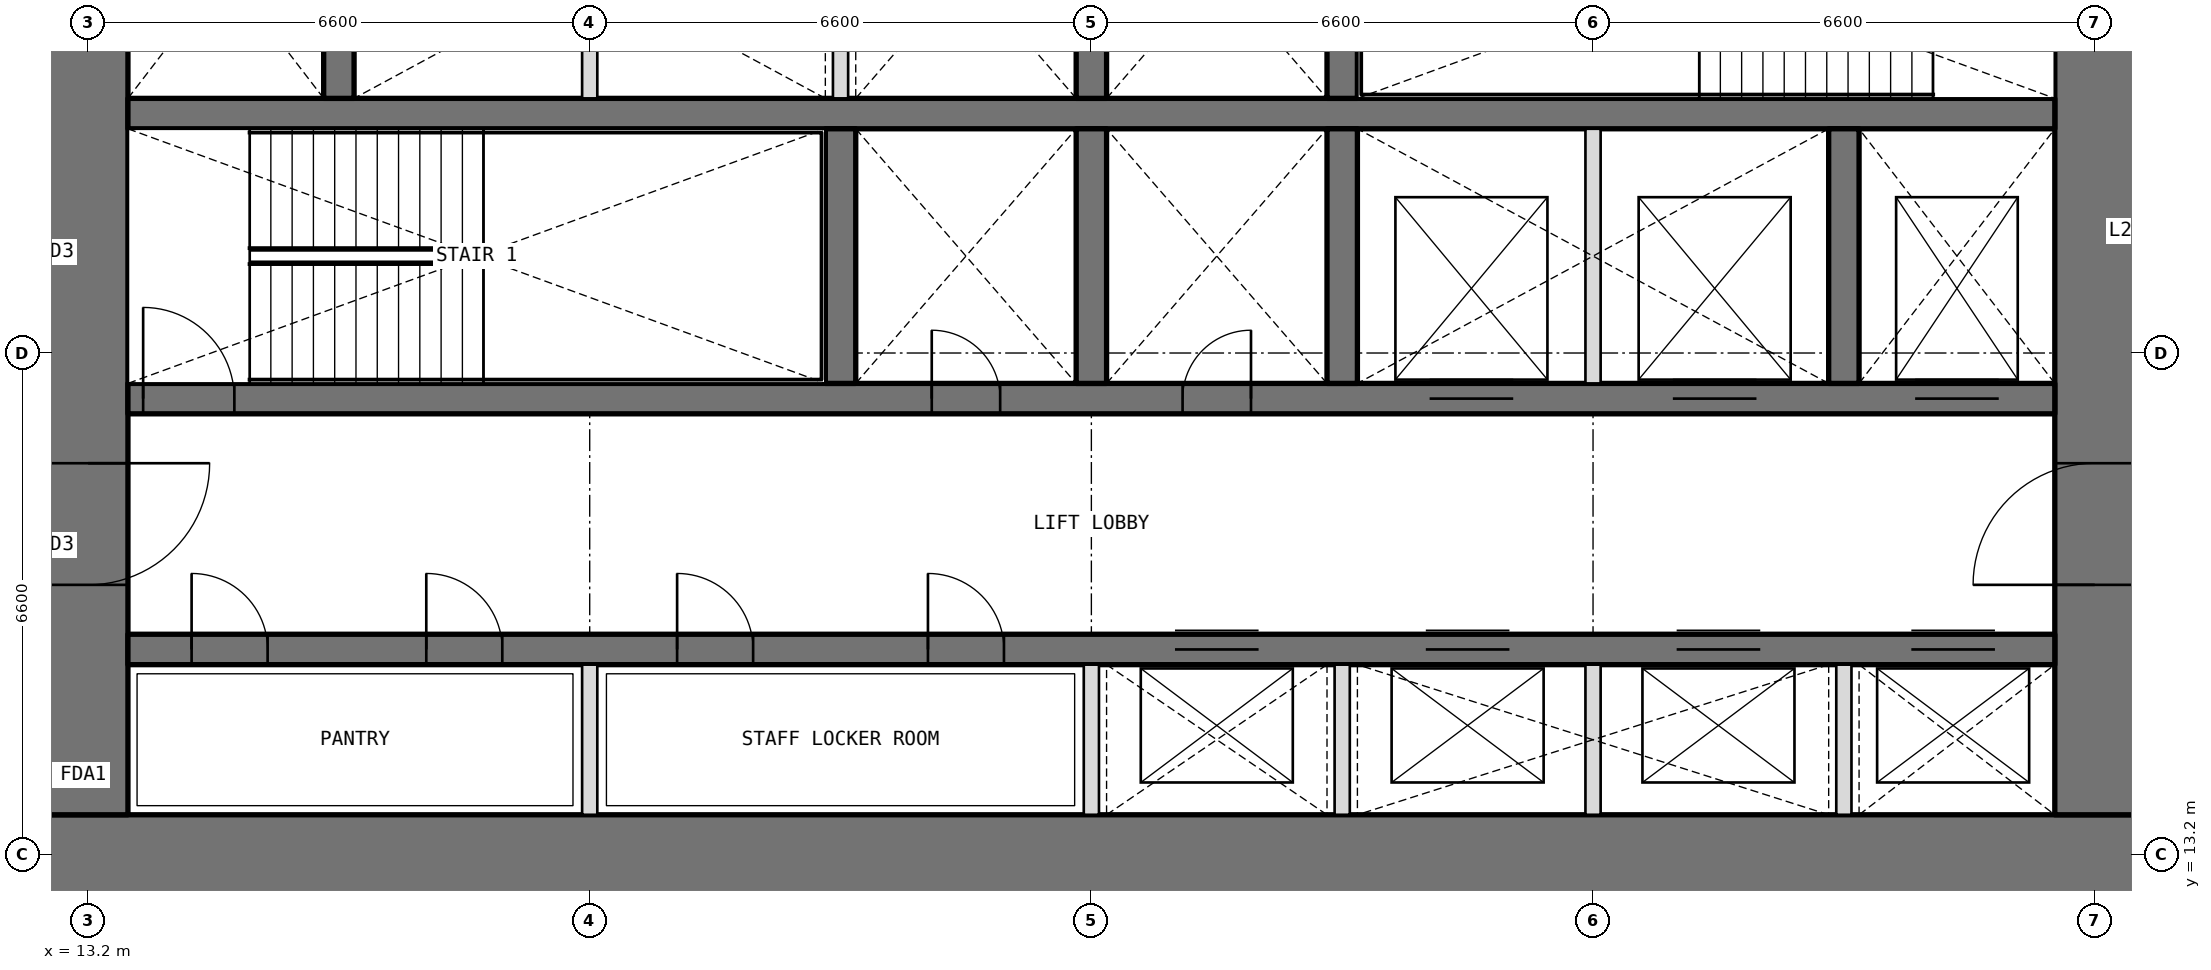
"""IFC4 building model, lengths in metres.
Left out: names, types, materials, properties, quantities, classifications, styles, units other than length and angle.
Written with IfcOpenShell. Run it as: python <this file> out.ifc"""

import sys

from ifc_helpers import new_model, si_unit, direction, frame, frame_2d, origin, place, context, subcontext, project, spatial, rectangle, extrude, element, fill, save


model = new_model("IFC4")
c1 = context("Model", 3, precision=1e-05, world=origin(), true_north=direction((0.0, 1.0)))
c2 = subcontext(c1, "Body", "Model", "MODEL_VIEW")
j1 = project(units=[si_unit("LENGTHUNIT", "METRE"), si_unit("PLANEANGLEUNIT", "RADIAN")], contexts=[c1])
p1 = place(None, origin())
s1 = spatial("IfcSite", under=j1, at=p1, CompositionType="ELEMENT")
p2 = place(p1, origin())
s2 = spatial("IfcBuilding", under=s1, at=p2, CompositionType="ELEMENT")
p3 = place(p2, frame((0.0, 0.0, 128.4)))
s3 = spatial("IfcBuildingStorey", under=s2, at=p3, CompositionType="ELEMENT", Elevation=128.4)
p4 = place(p3, frame((12.675, 13.2, 0.0), z_axis=(0.0, 0.0, 1.0), x_axis=(1.0, 0.0, 0.0)))
e1 = element("IfcWall", 1, at=p4, inside=s3, PredefinedType="SHEAR", context=c2, shape_type="SweptSolid", body=[
    extrude(rectangle(XDim=27.45, YDim=1.05, at=frame_2d((13.725, 0.0))), origin(), (0.0, 0.0, 1.0), 4.2),
])
p5 = place(p3, frame((39.6, 13.725, 0.0), z_axis=(0.0, 0.0, 1.0), x_axis=(0.0, 1.0, 0.0)))
e2 = element("IfcWall", 2, at=p5, inside=s3, PredefinedType="SHEAR", context=c2, shape_type="SweptSolid", body=[
    extrude(rectangle(XDim=18.75, YDim=1.05, at=frame_2d((9.375, 0.0))), origin(), (0.0, 0.0, 1.0), 4.2),
])
p6 = place(p5, frame((3.025, 0.0, 0.0)))
e3 = element("IfcOpeningElement", 3, at=p6, cuts=e2, PredefinedType="OPENING", context=c2, shape_type="SweptSolid", body=[
    extrude(rectangle(XDim=1.6, YDim=2.1, at=frame_2d((0.8, 1.05))), frame((0.0, 0.535, 0.0), z_axis=(0.0, -1.0, 0.0), x_axis=(1.0, 0.0, 0.0)), (0.0, 0.0, 1.0), 1.07),
])
p7 = place(p5, frame((13.825, 0.0, 0.0)))
e4 = element("IfcOpeningElement", 4, at=p7, cuts=e2, PredefinedType="OPENING", context=c2, shape_type="SweptSolid", body=[
    extrude(rectangle(XDim=1.6, YDim=2.1, at=frame_2d((0.8, 1.05))), frame((0.0, 0.535, 0.0), z_axis=(0.0, -1.0, 0.0), x_axis=(1.0, 0.0, 0.0)), (0.0, 0.0, 1.0), 1.07),
])
p8 = place(p3, frame((13.2, 32.475, 0.0), z_axis=(0.0, 0.0, 1.0), x_axis=(0.0, -1.0, 0.0)))
e5 = element("IfcWall", 5, at=p8, inside=s3, PredefinedType="SHEAR", context=c2, shape_type="SweptSolid", body=[
    extrude(rectangle(XDim=18.75, YDim=1.05, at=frame_2d((9.375, 0.0))), origin(), (0.0, 0.0, 1.0), 4.2),
])
p9 = place(p8, frame((14.125, 0.0, 0.0)))
e6 = element("IfcOpeningElement", 6, at=p9, cuts=e5, PredefinedType="OPENING", context=c2, shape_type="SweptSolid", body=[
    extrude(rectangle(XDim=1.6, YDim=2.1, at=frame_2d((0.8, 1.05))), frame((0.0, 0.535, 0.0), z_axis=(0.0, -1.0, 0.0), x_axis=(1.0, 0.0, 0.0)), (0.0, 0.0, 1.0), 1.07),
])
p10 = place(p8, frame((3.325, 0.0, 0.0)))
e7 = element("IfcOpeningElement", 7, at=p10, cuts=e5, PredefinedType="OPENING", context=c2, shape_type="SweptSolid", body=[
    extrude(rectangle(XDim=1.6, YDim=2.1, at=frame_2d((0.8, 1.05))), frame((0.0, 0.535, 0.0), z_axis=(0.0, -1.0, 0.0), x_axis=(1.0, 0.0, 0.0)), (0.0, 0.0, 1.0), 1.07),
])
p11 = place(p3, frame((13.725, 15.9, 0.0), z_axis=(0.0, 0.0, 1.0), x_axis=(1.0, 0.0, 0.0)))
e8 = element("IfcWall", 8, at=p11, inside=s3, PredefinedType="SHEAR", context=c2, shape_type="SweptSolid", body=[
    extrude(rectangle(XDim=25.35, YDim=0.4, at=frame_2d((12.675, 0.0))), origin(), (0.0, 0.0, 1.0), 4.2),
])
p12 = place(p11, frame((0.837, 0.0, 0.0)))
e9 = element("IfcOpeningElement", 9, at=p12, cuts=e8, PredefinedType="OPENING", context=c2, shape_type="SweptSolid", body=[
    extrude(rectangle(XDim=1.0, YDim=2.1, at=frame_2d((0.5, 1.05))), frame((0.0, 0.21, 0.0), z_axis=(0.0, -1.0, 0.0), x_axis=(1.0, 0.0, 0.0)), (0.0, 0.0, 1.0), 0.42),
])
p13 = place(p11, frame((3.925, 0.0, 0.0)))
e10 = element("IfcOpeningElement", 10, at=p13, cuts=e8, PredefinedType="OPENING", context=c2, shape_type="SweptSolid", body=[
    extrude(rectangle(XDim=1.0, YDim=2.1, at=frame_2d((0.5, 1.05))), frame((0.0, 0.21, 0.0), z_axis=(0.0, -1.0, 0.0), x_axis=(1.0, 0.0, 0.0)), (0.0, 0.0, 1.0), 0.42),
])
p14 = place(p11, frame((7.225, 0.0, 0.0)))
e11 = element("IfcOpeningElement", 11, at=p14, cuts=e8, PredefinedType="OPENING", context=c2, shape_type="SweptSolid", body=[
    extrude(rectangle(XDim=1.0, YDim=2.1, at=frame_2d((0.5, 1.05))), frame((0.0, 0.21, 0.0), z_axis=(0.0, -1.0, 0.0), x_axis=(1.0, 0.0, 0.0)), (0.0, 0.0, 1.0), 0.42),
])
p15 = place(p11, frame((10.525, 0.0, 0.0)))
e12 = element("IfcOpeningElement", 12, at=p15, cuts=e8, PredefinedType="OPENING", context=c2, shape_type="SweptSolid", body=[
    extrude(rectangle(XDim=1.0, YDim=2.1, at=frame_2d((0.5, 1.05))), frame((0.0, 0.21, 0.0), z_axis=(0.0, -1.0, 0.0), x_axis=(1.0, 0.0, 0.0)), (0.0, 0.0, 1.0), 0.42),
])
p16 = place(p11, frame((13.775, 0.0, 0.0)))
e13 = element("IfcOpeningElement", 13, at=p16, cuts=e8, PredefinedType="OPENING", context=c2, shape_type="SweptSolid", body=[
    extrude(rectangle(XDim=1.1, YDim=2.1, at=frame_2d((0.55, 1.05))), frame((0.0, 0.21, 0.0), z_axis=(0.0, -1.0, 0.0), x_axis=(1.0, 0.0, 0.0)), (0.0, 0.0, 1.0), 0.42),
])
p17 = place(p11, frame((17.075, 0.0, 0.0)))
e14 = element("IfcOpeningElement", 14, at=p17, cuts=e8, PredefinedType="OPENING", context=c2, shape_type="SweptSolid", body=[
    extrude(rectangle(XDim=1.1, YDim=2.1, at=frame_2d((0.55, 1.05))), frame((0.0, 0.21, 0.0), z_axis=(0.0, -1.0, 0.0), x_axis=(1.0, 0.0, 0.0)), (0.0, 0.0, 1.0), 0.42),
])
p18 = place(p11, frame((20.375, 0.0, 0.0)))
e15 = element("IfcOpeningElement", 15, at=p18, cuts=e8, PredefinedType="OPENING", context=c2, shape_type="SweptSolid", body=[
    extrude(rectangle(XDim=1.1, YDim=2.1, at=frame_2d((0.55, 1.05))), frame((0.0, 0.21, 0.0), z_axis=(0.0, -1.0, 0.0), x_axis=(1.0, 0.0, 0.0)), (0.0, 0.0, 1.0), 0.42),
])
p19 = place(p11, frame((23.462, 0.0, 0.0)))
e16 = element("IfcOpeningElement", 16, at=p19, cuts=e8, PredefinedType="OPENING", context=c2, shape_type="SweptSolid", body=[
    extrude(rectangle(XDim=1.1, YDim=2.1, at=frame_2d((0.55, 1.05))), frame((0.0, 0.21, 0.0), z_axis=(0.0, -1.0, 0.0), x_axis=(1.0, 0.0, 0.0)), (0.0, 0.0, 1.0), 0.42),
])
p20 = place(p3, frame((13.725, 19.2, 0.0), z_axis=(0.0, 0.0, 1.0), x_axis=(1.0, 0.0, 0.0)))
e17 = element("IfcWall", 17, at=p20, inside=s3, PredefinedType="SHEAR", context=c2, shape_type="SweptSolid", body=[
    extrude(rectangle(XDim=25.35, YDim=0.4, at=frame_2d((12.675, 0.0))), origin(), (0.0, 0.0, 1.0), 4.2),
])
p21 = place(p20, frame((10.575, 0.0, 0.0)))
e18 = element("IfcOpeningElement", 18, at=p21, cuts=e17, PredefinedType="OPENING", context=c2, shape_type="SweptSolid", body=[
    extrude(rectangle(XDim=0.9, YDim=2.1, at=frame_2d((0.45, 1.05))), frame((0.0, 0.21, 0.0), z_axis=(0.0, -1.0, 0.0), x_axis=(1.0, 0.0, 0.0)), (0.0, 0.0, 1.0), 0.42),
])
p22 = place(p20, frame((13.875, 0.0, 0.0)))
e19 = element("IfcOpeningElement", 19, at=p22, cuts=e17, PredefinedType="OPENING", context=c2, shape_type="SweptSolid", body=[
    extrude(rectangle(XDim=0.9, YDim=2.1, at=frame_2d((0.45, 1.05))), frame((0.0, 0.21, 0.0), z_axis=(0.0, -1.0, 0.0), x_axis=(1.0, 0.0, 0.0)), (0.0, 0.0, 1.0), 0.42),
])
p23 = place(p20, frame((0.2, 0.0, 0.0)))
e20 = element("IfcOpeningElement", 20, at=p23, cuts=e17, PredefinedType="OPENING", context=c2, shape_type="SweptSolid", body=[
    extrude(rectangle(XDim=1.2, YDim=2.1, at=frame_2d((0.6, 1.05))), frame((0.0, 0.21, 0.0), z_axis=(0.0, -1.0, 0.0), x_axis=(1.0, 0.0, 0.0)), (0.0, 0.0, 1.0), 0.42),
])
p24 = place(p20, frame((23.512, 0.0, 0.0)))
e21 = element("IfcOpeningElement", 21, at=p24, cuts=e17, PredefinedType="OPENING", context=c2, shape_type="SweptSolid", body=[
    extrude(rectangle(XDim=1.1, YDim=2.1, at=frame_2d((0.55, 1.05))), frame((0.0, 0.21, 0.0), z_axis=(0.0, -1.0, 0.0), x_axis=(1.0, 0.0, 0.0)), (0.0, 0.0, 1.0), 0.42),
])
p25 = place(p20, frame((17.125, 0.0, 0.0)))
e22 = element("IfcOpeningElement", 22, at=p25, cuts=e17, PredefinedType="OPENING", context=c2, shape_type="SweptSolid", body=[
    extrude(rectangle(XDim=1.1, YDim=2.1, at=frame_2d((0.55, 1.05))), frame((0.0, 0.21, 0.0), z_axis=(0.0, -1.0, 0.0), x_axis=(1.0, 0.0, 0.0)), (0.0, 0.0, 1.0), 0.42),
])
p26 = place(p20, frame((20.325, 0.0, 0.0)))
e23 = element("IfcOpeningElement", 23, at=p26, cuts=e17, PredefinedType="OPENING", context=c2, shape_type="SweptSolid", body=[
    extrude(rectangle(XDim=1.1, YDim=2.1, at=frame_2d((0.55, 1.05))), frame((0.0, 0.21, 0.0), z_axis=(0.0, -1.0, 0.0), x_axis=(1.0, 0.0, 0.0)), (0.0, 0.0, 1.0), 0.42),
])
p27 = place(p3, frame((13.725, 22.95, 0.0), z_axis=(0.0, 0.0, 1.0), x_axis=(1.0, 0.0, 0.0)))
e24 = element("IfcWall", 24, at=p27, inside=s3, PredefinedType="SHEAR", context=c2, shape_type="SweptSolid", body=[
    extrude(rectangle(XDim=25.35, YDim=0.4, at=frame_2d((12.675, 0.0))), origin(), (0.0, 0.0, 1.0), 4.2),
])
for number, where, z_axis, x_axis in (
    (25, (23.1, 19.4, 0.0), (0.0, 0.0, 1.0), (0.0, 1.0, 0.0)),
    (26, (26.4, 19.4, 0.0), (0.0, 0.0, 1.0), (0.0, 1.0, 0.0)),
    (27, (29.7, 19.4, 0.0), (0.0, 0.0, 1.0), (0.0, 1.0, 0.0)),
    (28, (36.3, 19.4, 0.0), (0.0, 0.0, 1.0), (0.0, 1.0, 0.0)),
    (29, (16.5, 23.15, 0.0), (0.0, 0.0, 1.0), (0.0, 1.0, 0.0)),
    (30, (26.4, 23.15, 0.0), (0.0, 0.0, 1.0), (0.0, 1.0, 0.0)),
    (31, (29.7, 23.15, 0.0), (0.0, 0.0, 1.0), (0.0, 1.0, 0.0)),
):
    element("IfcWall", number, at=place(p3, frame(where, z_axis=z_axis, x_axis=x_axis)), inside=s3, PredefinedType="SHEAR", context=c2, shape_type="SweptSolid", body=[
        extrude(rectangle(XDim=3.35, YDim=0.4, at=frame_2d((1.675, 0.0))), origin(), (0.0, 0.0, 1.0), 4.2),
    ])
for number, where, z_axis, x_axis in (
    (32, (19.8, 13.725, 0.0), (0.0, 0.0, 1.0), (0.0, 1.0, 0.0)),
    (33, (26.4, 13.725, 0.0), (0.0, 0.0, 1.0), (0.0, 1.0, 0.0)),
    (34, (29.7, 13.725, 0.0), (0.0, 0.0, 1.0), (0.0, 1.0, 0.0)),
    (35, (33.0, 13.725, 0.0), (0.0, 0.0, 1.0), (0.0, 1.0, 0.0)),
    (36, (36.3, 13.725, 0.0), (0.0, 0.0, 1.0), (0.0, 1.0, 0.0)),
):
    element("IfcWall", number, at=place(p3, frame(where, z_axis=z_axis, x_axis=x_axis)), inside=s3, PredefinedType="PARTITIONING", context=c2, shape_type="SweptSolid", body=[
        extrude(rectangle(XDim=1.975, YDim=0.2, at=frame_2d((0.987, 0.0))), origin(), (0.0, 0.0, 1.0), 4.2),
    ])
for number, where, z_axis, x_axis in (
    (37, (33.0, 19.4, 0.0), (0.0, 0.0, 1.0), (0.0, 1.0, 0.0)),
    (38, (19.8, 23.15, 0.0), (0.0, 0.0, 1.0), (0.0, 1.0, 0.0)),
    (39, (23.1, 23.15, 0.0), (0.0, 0.0, 1.0), (0.0, 1.0, 0.0)),
):
    element("IfcWall", number, at=place(p3, frame(where, z_axis=z_axis, x_axis=x_axis)), inside=s3, PredefinedType="PARTITIONING", context=c2, shape_type="SweptSolid", body=[
        extrude(rectangle(XDim=3.35, YDim=0.2, at=frame_2d((1.675, 0.0))), origin(), (0.0, 0.0, 1.0), 4.2),
    ])
p28 = place(p21, origin())
e40 = element("IfcDoor", 40, at=p28, inside=s3, OperationType="SINGLE_SWING_LEFT", PredefinedType="DOOR", context=c2, shape_type="SweptSolid", body=[
    extrude(rectangle(XDim=0.9, YDim=2.1, at=frame_2d((0.45, 1.05))), frame((0.0, 0.025, 0.0), z_axis=(0.0, -1.0, 0.0), x_axis=(1.0, 0.0, 0.0)), (0.0, 0.0, 1.0), 0.05),
])
fill(e18, e40)
p29 = place(p22, origin())
e41 = element("IfcDoor", 41, at=p29, inside=s3, OperationType="SINGLE_SWING_RIGHT", PredefinedType="DOOR", context=c2, shape_type="SweptSolid", body=[
    extrude(rectangle(XDim=0.9, YDim=2.1, at=frame_2d((0.45, 1.05))), frame((0.0, 0.025, 0.0), z_axis=(0.0, -1.0, 0.0), x_axis=(1.0, 0.0, 0.0)), (0.0, 0.0, 1.0), 0.05),
])
fill(e19, e41)
p30 = place(p12, origin())
e42 = element("IfcDoor", 42, at=p30, inside=s3, OperationType="SINGLE_SWING_LEFT", PredefinedType="DOOR", context=c2, shape_type="SweptSolid", body=[
    extrude(rectangle(XDim=1.0, YDim=2.1, at=frame_2d((0.5, 1.05))), frame((0.0, 0.025, 0.0), z_axis=(0.0, -1.0, 0.0), x_axis=(1.0, 0.0, 0.0)), (0.0, 0.0, 1.0), 0.05),
])
fill(e9, e42)
p31 = place(p13, origin())
e43 = element("IfcDoor", 43, at=p31, inside=s3, OperationType="SINGLE_SWING_LEFT", PredefinedType="DOOR", context=c2, shape_type="SweptSolid", body=[
    extrude(rectangle(XDim=1.0, YDim=2.1, at=frame_2d((0.5, 1.05))), frame((0.0, 0.025, 0.0), z_axis=(0.0, -1.0, 0.0), x_axis=(1.0, 0.0, 0.0)), (0.0, 0.0, 1.0), 0.05),
])
fill(e10, e43)
p32 = place(p14, origin())
e44 = element("IfcDoor", 44, at=p32, inside=s3, OperationType="SINGLE_SWING_LEFT", PredefinedType="DOOR", context=c2, shape_type="SweptSolid", body=[
    extrude(rectangle(XDim=1.0, YDim=2.1, at=frame_2d((0.5, 1.05))), frame((0.0, 0.025, 0.0), z_axis=(0.0, -1.0, 0.0), x_axis=(1.0, 0.0, 0.0)), (0.0, 0.0, 1.0), 0.05),
])
fill(e11, e44)
p33 = place(p15, origin())
e45 = element("IfcDoor", 45, at=p33, inside=s3, OperationType="SINGLE_SWING_LEFT", PredefinedType="DOOR", context=c2, shape_type="SweptSolid", body=[
    extrude(rectangle(XDim=1.0, YDim=2.1, at=frame_2d((0.5, 1.05))), frame((0.0, 0.025, 0.0), z_axis=(0.0, -1.0, 0.0), x_axis=(1.0, 0.0, 0.0)), (0.0, 0.0, 1.0), 0.05),
])
fill(e12, e45)
p34 = place(p23, origin())
e46 = element("IfcDoor", 46, at=p34, inside=s3, OperationType="SINGLE_SWING_LEFT", PredefinedType="DOOR", context=c2, shape_type="SweptSolid", body=[
    extrude(rectangle(XDim=1.2, YDim=2.1, at=frame_2d((0.6, 1.05))), frame((0.0, 0.025, 0.0), z_axis=(0.0, -1.0, 0.0), x_axis=(1.0, 0.0, 0.0)), (0.0, 0.0, 1.0), 0.05),
])
fill(e20, e46)
p35 = place(p9, origin())
e47 = element("IfcDoor", 47, at=p35, inside=s3, OperationType="DOUBLE_DOOR_DOUBLE_SWING", PredefinedType="DOOR", context=c2, shape_type="SweptSolid", body=[
    extrude(rectangle(XDim=1.6, YDim=2.1, at=frame_2d((0.8, 1.05))), frame((0.0, 0.025, 0.0), z_axis=(0.0, -1.0, 0.0), x_axis=(1.0, 0.0, 0.0)), (0.0, 0.0, 1.0), 0.05),
])
fill(e6, e47)
p36 = place(p6, origin())
e48 = element("IfcDoor", 48, at=p36, inside=s3, OperationType="DOUBLE_DOOR_DOUBLE_SWING", PredefinedType="DOOR", context=c2, shape_type="SweptSolid", body=[
    extrude(rectangle(XDim=1.6, YDim=2.1, at=frame_2d((0.8, 1.05))), frame((0.0, 0.025, 0.0), z_axis=(0.0, -1.0, 0.0), x_axis=(1.0, 0.0, 0.0)), (0.0, 0.0, 1.0), 0.05),
])
fill(e3, e48)
p37 = place(p16, origin())
e49 = element("IfcDoor", 49, at=p37, inside=s3, OperationType="DOUBLE_DOOR_SLIDING", PredefinedType="DOOR", context=c2, shape_type="SweptSolid", body=[
    extrude(rectangle(XDim=1.1, YDim=2.1, at=frame_2d((0.55, 1.05))), frame((0.0, 0.025, 0.0), z_axis=(0.0, -1.0, 0.0), x_axis=(1.0, 0.0, 0.0)), (0.0, 0.0, 1.0), 0.05),
])
fill(e13, e49)
p38 = place(p17, origin())
e50 = element("IfcDoor", 50, at=p38, inside=s3, OperationType="DOUBLE_DOOR_SLIDING", PredefinedType="DOOR", context=c2, shape_type="SweptSolid", body=[
    extrude(rectangle(XDim=1.1, YDim=2.1, at=frame_2d((0.55, 1.05))), frame((0.0, 0.025, 0.0), z_axis=(0.0, -1.0, 0.0), x_axis=(1.0, 0.0, 0.0)), (0.0, 0.0, 1.0), 0.05),
])
fill(e14, e50)
p39 = place(p18, origin())
e51 = element("IfcDoor", 51, at=p39, inside=s3, OperationType="DOUBLE_DOOR_SLIDING", PredefinedType="DOOR", context=c2, shape_type="SweptSolid", body=[
    extrude(rectangle(XDim=1.1, YDim=2.1, at=frame_2d((0.55, 1.05))), frame((0.0, 0.025, 0.0), z_axis=(0.0, -1.0, 0.0), x_axis=(1.0, 0.0, 0.0)), (0.0, 0.0, 1.0), 0.05),
])
fill(e15, e51)
p40 = place(p19, origin())
e52 = element("IfcDoor", 52, at=p40, inside=s3, OperationType="DOUBLE_DOOR_SLIDING", PredefinedType="DOOR", context=c2, shape_type="SweptSolid", body=[
    extrude(rectangle(XDim=1.1, YDim=2.1, at=frame_2d((0.55, 1.05))), frame((0.0, 0.025, 0.0), z_axis=(0.0, -1.0, 0.0), x_axis=(1.0, 0.0, 0.0)), (0.0, 0.0, 1.0), 0.05),
])
fill(e16, e52)
p41 = place(p24, origin())
e53 = element("IfcDoor", 53, at=p41, inside=s3, OperationType="DOUBLE_DOOR_SLIDING", PredefinedType="DOOR", context=c2, shape_type="SweptSolid", body=[
    extrude(rectangle(XDim=1.1, YDim=2.1, at=frame_2d((0.55, 1.05))), frame((0.0, 0.025, 0.0), z_axis=(0.0, -1.0, 0.0), x_axis=(1.0, 0.0, 0.0)), (0.0, 0.0, 1.0), 0.05),
])
fill(e21, e53)
p42 = place(p25, origin())
e54 = element("IfcDoor", 54, at=p42, inside=s3, OperationType="DOUBLE_DOOR_SLIDING", PredefinedType="DOOR", context=c2, shape_type="SweptSolid", body=[
    extrude(rectangle(XDim=1.1, YDim=2.1, at=frame_2d((0.55, 1.05))), frame((0.0, 0.025, 0.0), z_axis=(0.0, -1.0, 0.0), x_axis=(1.0, 0.0, 0.0)), (0.0, 0.0, 1.0), 0.05),
])
fill(e22, e54)
p43 = place(p26, origin())
e55 = element("IfcDoor", 55, at=p43, inside=s3, OperationType="DOUBLE_DOOR_SLIDING", PredefinedType="DOOR", context=c2, shape_type="SweptSolid", body=[
    extrude(rectangle(XDim=1.1, YDim=2.1, at=frame_2d((0.55, 1.05))), frame((0.0, 0.025, 0.0), z_axis=(0.0, -1.0, 0.0), x_axis=(1.0, 0.0, 0.0)), (0.0, 0.0, 1.0), 0.05),
])
fill(e23, e55)
save(model, sys.argv[1])
